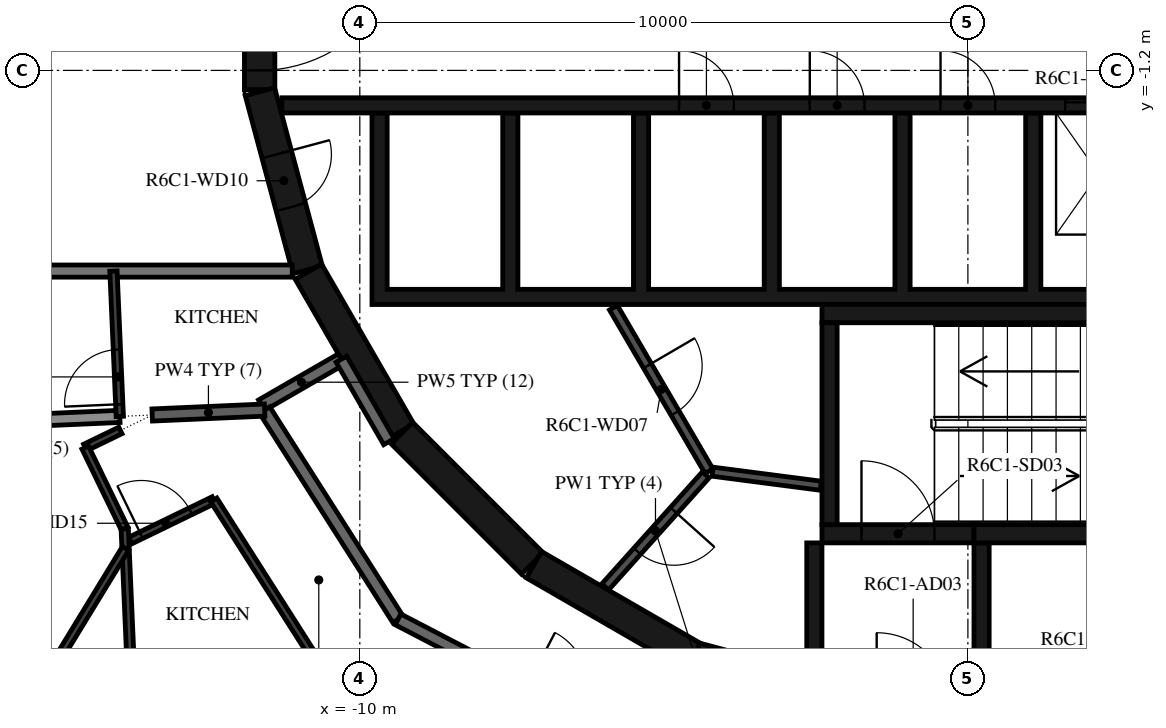
"""IFC4 building model, lengths in metres.
Left out: names, types, materials, properties, quantities, classifications, styles, units other than length and angle.
Written with IfcOpenShell. Run it as: python <this file> out.ifc"""

import sys

from ifc_helpers import new_model, si_unit, direction, frame, frame_2d, origin, place, context, subcontext, project, spatial, polyline, rectangle, outline, extrude, element, fill, save


model = new_model("IFC4")
c1 = context("Model", 3, precision=1e-05, world=origin(), true_north=direction((0.0, 1.0)))
c2 = subcontext(c1, "Body", "Model", "MODEL_VIEW")
j1 = project(units=[si_unit("LENGTHUNIT", "METRE"), si_unit("PLANEANGLEUNIT", "RADIAN")], contexts=[c1])
p1 = place(None, origin())
s1 = spatial("IfcSite", under=j1, at=p1, CompositionType="ELEMENT")
p2 = place(p1, origin())
s2 = spatial("IfcBuilding", under=s1, at=p2, CompositionType="ELEMENT")
p3 = place(p2, frame((0.0, 0.0, 251.2)))
s3 = spatial("IfcBuildingStorey", under=s2, at=p3, CompositionType="ELEMENT", Elevation=251.2)
p4 = place(p3, frame((1.55, -11.643, 0.0), z_axis=(0.0, 0.0, 1.0), x_axis=(0.965948410781, 0.258734743916, 0.0)))
e1 = element("IfcWall", 1, at=p4, inside=s3, PredefinedType="SHEAR", context=c2, shape_type="SweptSolid", body=[
    extrude(rectangle(XDim=3.033, YDim=0.5, at=frame_2d((1.516, 0.0))), origin(), (0.0, 0.0, 1.0), 3.12),
])
p5 = place(p3, frame((-11.647, 1.516, 0.0), z_axis=(0.0, 0.0, 1.0), x_axis=(0.0, -1.0, 0.0)))
e2 = element("IfcWall", 2, at=p5, inside=s3, PredefinedType="SHEAR", context=c2, shape_type="SweptSolid", body=[
    extrude(rectangle(XDim=3.033, YDim=0.5, at=frame_2d((1.516, 0.0))), origin(), (0.0, 0.0, 1.0), 3.12),
])
p6 = place(p5, frame((0.316, 0.0, 0.0)))
e3 = element("IfcOpeningElement", 3, at=p6, cuts=e2, PredefinedType="OPENING", context=c2, shape_type="SweptSolid", body=[
    extrude(rectangle(XDim=2.4, YDim=2.1, at=frame_2d((1.2, 1.05))), frame((0.0, 0.26, 0.0), z_axis=(0.0, -1.0, 0.0), x_axis=(1.0, 0.0, 0.0)), (0.0, 0.0, 1.0), 0.52),
])
p7 = place(p3, frame((-11.643, -1.55, 0.0), z_axis=(0.0, 0.0, 1.0), x_axis=(0.258734743916, -0.965948410781, 0.0)))
e4 = element("IfcWall", 4, at=p7, inside=s3, PredefinedType="SHEAR", context=c2, shape_type="SweptSolid", body=[
    extrude(rectangle(XDim=3.033, YDim=0.5, at=frame_2d((1.516, 0.0))), origin(), (0.0, 0.0, 1.0), 3.12),
])
p8 = place(p7, frame((1.066, 0.0, 0.0)))
e5 = element("IfcOpeningElement", 5, at=p8, cuts=e4, PredefinedType="OPENING", context=c2, shape_type="SweptSolid", body=[
    extrude(rectangle(XDim=0.9, YDim=2.1, at=frame_2d((0.45, 1.05))), frame((0.0, 0.26, 0.0), z_axis=(0.0, -1.0, 0.0), x_axis=(1.0, 0.0, 0.0)), (0.0, 0.0, 1.0), 0.52),
])
p9 = place(p3, frame((-10.845, -4.51, 0.0), z_axis=(0.0, 0.0, 1.0), x_axis=(0.500087131594, -0.865975092491, 0.0)))
e6 = element("IfcWall", 6, at=p9, inside=s3, PredefinedType="SHEAR", context=c2, shape_type="SweptSolid", body=[
    extrude(rectangle(XDim=3.033, YDim=0.5, at=frame_2d((1.516, 0.0))), origin(), (0.0, 0.0, 1.0), 3.12),
])
p10 = place(p3, frame((-9.308, -7.164, 0.0), z_axis=(0.0, 0.0, 1.0), x_axis=(0.707106781187, -0.707106781187, 0.0)))
e7 = element("IfcWall", 7, at=p10, inside=s3, PredefinedType="SHEAR", context=c2, shape_type="SweptSolid", body=[
    extrude(rectangle(XDim=3.032, YDim=0.5, at=frame_2d((1.516, 0.0))), origin(), (0.0, 0.0, 1.0), 3.12),
])
for number, where, z_axis, x_axis in (
    (8, (-7.137, -9.329, 0.0), (0.0, 0.0, 1.0), (0.866, -0.5, 0.0)),
    (9, (-4.479, -10.858, 0.0), (0.0, 0.0, 1.0), (0.966, -0.259, 0.0)),
):
    element("IfcWall", number, at=place(p3, frame(where, z_axis=z_axis, x_axis=x_axis)), inside=s3, PredefinedType="SHEAR", context=c2, shape_type="SweptSolid", body=[
        extrude(rectangle(XDim=3.033, YDim=0.5, at=frame_2d((1.516, 0.0))), origin(), (0.0, 0.0, 1.0), 3.12),
    ])
p11 = place(p3, frame((-2.275, -8.67, 0.0), z_axis=(0.0, 0.0, 1.0), x_axis=(0.0, 1.0, 0.0)))
e10 = element("IfcWall", 10, at=p11, inside=s3, PredefinedType="SHEAR", context=c2, shape_type="SweptSolid", body=[
    extrude(rectangle(XDim=3.32, YDim=0.25, at=frame_2d((1.66, 0.0))), origin(), (0.0, 0.0, 1.0), 3.12),
])
p12 = place(p3, frame((-2.4, -5.2, 0.0), z_axis=(0.0, 0.0, 1.0), x_axis=(1.0, 0.0, 0.0)))
e11 = element("IfcWall", 11, at=p12, inside=s3, PredefinedType="SHEAR", context=c2, shape_type="SweptSolid", body=[
    extrude(rectangle(XDim=7.05, YDim=0.3, at=frame_2d((3.525, 0.0))), origin(), (0.0, 0.0, 1.0), 3.12),
])
p13 = place(p3, frame((0.1, -8.82, 0.0), z_axis=(0.0, 0.0, 1.0), x_axis=(1.0, 0.0, 0.0)))
e12 = element("IfcWall", 12, at=p13, inside=s3, PredefinedType="SHEAR", context=c2, shape_type="SweptSolid", body=[
    extrude(rectangle(XDim=4.55, YDim=0.3, at=frame_2d((2.275, 0.0))), origin(), (0.0, 0.0, 1.0), 3.12),
])
p14 = place(p3, frame((-2.4, -8.82, 0.0), z_axis=(0.0, 0.0, 1.0), x_axis=(1.0, 0.0, 0.0)))
e13 = element("IfcWall", 13, at=p14, inside=s3, PredefinedType="SHEAR", context=c2, shape_type="SweptSolid", body=[
    extrude(rectangle(XDim=2.5, YDim=0.3, at=frame_2d((1.25, 0.0))), origin(), (0.0, 0.0, 1.0), 3.12),
])
p15 = place(p14, frame((0.65, 0.0, 0.0)))
e14 = element("IfcOpeningElement", 14, at=p15, cuts=e13, PredefinedType="OPENING", context=c2, shape_type="SweptSolid", body=[
    extrude(rectangle(XDim=1.2, YDim=2.1, at=frame_2d((0.6, 1.05))), frame((0.0, 0.16, 0.0), z_axis=(0.0, -1.0, 0.0), x_axis=(1.0, 0.0, 0.0)), (0.0, 0.0, 1.0), 0.32),
])
p16 = place(p3, frame((-2.525, -8.97, 0.0), z_axis=(0.0, 0.0, 1.0), x_axis=(0.0, -1.0, 0.0)))
e15 = element("IfcWall", 15, at=p16, inside=s3, PredefinedType="SHEAR", context=c2, shape_type="SweptSolid", body=[
    extrude(rectangle(XDim=2.11, YDim=0.25, at=frame_2d((1.055, 0.0))), origin(), (0.0, 0.0, 1.0), 3.12),
])
p17 = place(p3, frame((0.225, -8.97, 0.0), z_axis=(0.0, 0.0, 1.0), x_axis=(0.0, -1.0, 0.0)))
e16 = element("IfcWall", 16, at=p17, inside=s3, PredefinedType="SHEAR", context=c2, shape_type="SweptSolid", body=[
    extrude(rectangle(XDim=2.41, YDim=0.25, at=frame_2d((1.205, 0.0))), origin(), (0.0, 0.0, 1.0), 3.12),
])
p18 = place(p3, origin())
e17 = element("IfcWall", 17, at=p18, inside=s3, PredefinedType="SHEAR", context=c2, shape_type="SweptSolid", body=[
    extrude(outline(polyline([(9.8, -5.05), (9.8, -4.8), (9.8, -1.9), (9.55, -1.9), (9.55, -4.8), (7.65, -4.8), (7.65, -1.9), (7.4, -1.9), (7.4, -4.8), (5.5, -4.8), (5.5, -1.9), (5.25, -1.9), (5.25, -4.8), (3.35, -4.8), (3.35, -1.9), (3.1, -1.9), (3.1, -4.8), (1.2, -4.8), (1.2, -1.9), (0.95, -1.9), (0.95, -4.8), (-0.95, -4.8), (-0.95, -1.9), (-1.2, -1.9), (-1.2, -4.8), (-3.1, -4.8), (-3.1, -1.9), (-3.35, -1.9), (-3.35, -4.8), (-5.25, -4.8), (-5.25, -1.9), (-5.5, -1.9), (-5.5, -4.8), (-7.4, -4.8), (-7.4, -1.9), (-7.65, -1.9), (-7.65, -4.8), (-9.55, -4.8), (-9.55, -1.9), (-9.8, -1.9), (-9.8, -4.8), (-9.8, -5.05), (9.8, -5.05)])), origin(), (0.0, 0.0, 1.0), 3.12),
])
p19 = place(p3, frame((-11.28, -1.775, 0.0), z_axis=(0.0, 0.0, 1.0), x_axis=(1.0, 0.0, 0.0)))
e18 = element("IfcWall", 18, at=p19, inside=s3, PredefinedType="SHEAR", context=c2, shape_type="SweptSolid", body=[
    extrude(rectangle(XDim=14.38, YDim=0.25, at=frame_2d((7.19, 0.0))), origin(), (0.0, 0.0, 1.0), 3.12),
])
p20 = place(p19, frame((12.88, 0.0, 0.0)))
e19 = element("IfcOpeningElement", 19, at=p20, cuts=e18, PredefinedType="OPENING", context=c2, shape_type="SweptSolid", body=[
    extrude(rectangle(XDim=1.1, YDim=2.1, at=frame_2d((0.55, 1.05))), frame((0.0, 0.135, 0.0), z_axis=(0.0, -1.0, 0.0), x_axis=(1.0, 0.0, 0.0)), (0.0, 0.0, 1.0), 0.27),
])
p21 = place(p19, frame((6.53, 0.0, 0.0)))
e20 = element("IfcOpeningElement", 20, at=p21, cuts=e18, PredefinedType="OPENING", context=c2, shape_type="SweptSolid", body=[
    extrude(rectangle(XDim=0.9, YDim=2.1, at=frame_2d((0.45, 1.05))), frame((0.0, 0.135, 0.0), z_axis=(0.0, -1.0, 0.0), x_axis=(1.0, 0.0, 0.0)), (0.0, 0.0, 1.0), 0.27),
])
p22 = place(p19, frame((8.68, 0.0, 0.0)))
e21 = element("IfcOpeningElement", 21, at=p22, cuts=e18, PredefinedType="OPENING", context=c2, shape_type="SweptSolid", body=[
    extrude(rectangle(XDim=0.9, YDim=2.1, at=frame_2d((0.45, 1.05))), frame((0.0, 0.135, 0.0), z_axis=(0.0, -1.0, 0.0), x_axis=(1.0, 0.0, 0.0)), (0.0, 0.0, 1.0), 0.27),
])
p23 = place(p19, frame((10.83, 0.0, 0.0)))
e22 = element("IfcOpeningElement", 22, at=p23, cuts=e18, PredefinedType="OPENING", context=c2, shape_type="SweptSolid", body=[
    extrude(rectangle(XDim=0.9, YDim=2.1, at=frame_2d((0.45, 1.05))), frame((0.0, 0.135, 0.0), z_axis=(0.0, -1.0, 0.0), x_axis=(1.0, 0.0, 0.0)), (0.0, 0.0, 1.0), 0.27),
])
p24 = place(p3, frame((-5.829, -5.102, 0.0), z_axis=(0.0, 0.0, 1.0), x_axis=(0.504480008384, -0.863423373057, 0.0)))
e23 = element("IfcWall", 23, at=p24, inside=s3, PredefinedType="PARTITIONING", context=c2, shape_type="SweptSolid", body=[
    extrude(rectangle(XDim=3.115, YDim=0.15, at=frame_2d((1.558, 0.0))), origin(), (0.0, 0.0, 1.0), 3.12),
])
p25 = place(p24, frame((1.107, 0.0, 0.0)))
e24 = element("IfcOpeningElement", 24, at=p25, cuts=e23, PredefinedType="OPENING", context=c2, shape_type="SweptSolid", body=[
    extrude(rectangle(XDim=0.9, YDim=2.1, at=frame_2d((0.45, 1.05))), frame((0.0, 0.085, 0.0), z_axis=(0.0, -1.0, 0.0), x_axis=(1.0, 0.0, 0.0)), (0.0, 0.0, 1.0), 0.17),
])
p26 = place(p3, frame((-4.311, -7.851, 0.0), z_axis=(0.0, 0.0, 1.0), x_axis=(-0.667869133096, -0.744278725383, 0.0)))
e25 = element("IfcWall", 25, at=p26, inside=s3, PredefinedType="PARTITIONING", context=c2, shape_type="SweptSolid", body=[
    extrude(rectangle(XDim=2.476, YDim=0.15, at=frame_2d((1.238, 0.0))), origin(), (0.0, 0.0, 1.0), 3.12),
])
p27 = place(p26, frame((0.788, 0.0, 0.0)))
e26 = element("IfcOpeningElement", 26, at=p27, cuts=e25, PredefinedType="OPENING", context=c2, shape_type="SweptSolid", body=[
    extrude(rectangle(XDim=0.9, YDim=2.1, at=frame_2d((0.45, 1.05))), frame((0.0, 0.085, 0.0), z_axis=(0.0, -1.0, 0.0), x_axis=(1.0, 0.0, 0.0)), (0.0, 0.0, 1.0), 0.17),
])
p28 = place(p3, frame((-4.198, -7.799, 0.0), z_axis=(0.0, 0.0, 1.0), x_axis=(0.991686747293, -0.128675542523, 0.0)))
e27 = element("IfcWall", 27, at=p28, inside=s3, PredefinedType="PARTITIONING", context=c2, shape_type="SweptSolid", body=[
    extrude(rectangle(XDim=1.793, YDim=0.15, at=frame_2d((0.896, 0.0))), origin(), (0.0, 0.0, 1.0), 3.12),
])
p29 = place(p3, frame((-10.303, -5.949, 0.0), z_axis=(0.0, 0.0, 1.0), x_axis=(-0.866043382451, -0.499968858743, 0.0)))
e28 = element("IfcWall", 28, at=p29, inside=s3, PredefinedType="STANDARD", context=c2, shape_type="SweptSolid", body=[
    extrude(rectangle(XDim=1.515, YDim=0.2, at=frame_2d((0.758, 0.0))), origin(), (0.0, 0.0, 1.0), 3.12),
])
p30 = place(p3, frame((-9.52, -7.305, 0.0), z_axis=(0.0, 0.0, 1.0), x_axis=(-0.500028278809, 0.866009076391, 0.0)))
e29 = element("IfcWall", 29, at=p30, inside=s3, PredefinedType="STANDARD", context=c2, shape_type="SweptSolid", body=[
    extrude(rectangle(XDim=1.566, YDim=0.2, at=frame_2d((0.783, 0.0))), origin(), (0.0, 0.0, 1.0), 3.12),
])
p31 = place(p3, frame((-11.565, -6.786, 0.0), z_axis=(0.0, 0.0, 1.0), x_axis=(0.537297327359, -0.843392898958, 0.0)))
e30 = element("IfcWall", 30, at=p31, inside=s3, PredefinedType="STANDARD", context=c2, shape_type="SweptSolid", body=[
    extrude(rectangle(XDim=4.081, YDim=0.2, at=frame_2d((2.041, 0.0))), origin(), (0.0, 0.0, 1.0), 3.12),
])
p32 = place(p3, frame((-9.372, -10.228, 0.0), z_axis=(0.0, 0.0, 1.0), x_axis=(0.887005184532, -0.461759464021, 0.0)))
e31 = element("IfcWall", 31, at=p32, inside=s3, PredefinedType="STANDARD", context=c2, shape_type="SweptSolid", body=[
    extrude(rectangle(XDim=7.181, YDim=0.2, at=frame_2d((3.591, 0.0))), origin(), (0.0, 0.0, 1.0), 3.12),
])
p33 = place(p32, frame((2.391, 0.0, 0.0)))
e32 = element("IfcOpeningElement", 32, at=p33, cuts=e31, PredefinedType="OPENING", context=c2, shape_type="SweptSolid", body=[
    extrude(rectangle(XDim=1.0, YDim=2.1, at=frame_2d((0.5, 1.05))), frame((0.0, 0.11, 0.0), z_axis=(0.0, -1.0, 0.0), x_axis=(1.0, 0.0, 0.0)), (0.0, 0.0, 1.0), 0.22),
])
p34 = place(p3, frame((-17.655, -4.5, 0.0), z_axis=(0.0, 0.0, 1.0), x_axis=(1.0, 0.0, 0.0)))
e33 = element("IfcWall", 33, at=p34, inside=s3, PredefinedType="STANDARD", context=c2, shape_type="SweptSolid", body=[
    extrude(rectangle(XDim=6.543, YDim=0.2, at=frame_2d((3.272, 0.0))), origin(), (0.0, 0.0, 1.0), 3.12),
])
p35 = place(p3, frame((-17.544, -7.047, 0.0), z_axis=(0.0, 0.0, 1.0), x_axis=(0.999045894436, 0.043672655174, 0.0)))
e34 = element("IfcWall", 34, at=p35, inside=s3, PredefinedType="STANDARD", context=c2, shape_type="SweptSolid", body=[
    extrude(rectangle(XDim=3.6, YDim=0.2, at=frame_2d((1.8, 0.0))), origin(), (0.0, 0.0, 1.0), 2.73),
])
p36 = place(p3, frame((-13.414, -6.867, 0.0), z_axis=(0.0, 0.0, 1.0), x_axis=(0.999046427216, 0.043660465726, 0.0)))
e35 = element("IfcWall", 35, at=p36, inside=s3, PredefinedType="STANDARD", context=c2, shape_type="SweptSolid", body=[
    extrude(rectangle(XDim=1.851, YDim=0.2, at=frame_2d((0.925, 0.0))), origin(), (0.0, 0.0, 1.0), 3.12),
])
p37 = place(p3, frame((-13.947, -6.89, 0.0), z_axis=(0.0, 0.0, 1.0), x_axis=(-0.043680814195, 0.999045537737, 0.0)))
e36 = element("IfcWall", 36, at=p37, inside=s3, PredefinedType="PARTITIONING", context=c2, shape_type="SweptSolid", body=[
    extrude(rectangle(XDim=2.392, YDim=0.12, at=frame_2d((1.196, 0.0))), origin(), (0.0, 0.0, 1.0), 3.12),
])
p38 = place(p37, frame((0.2, 0.0, 0.0)))
e37 = element("IfcOpeningElement", 37, at=p38, cuts=e36, PredefinedType="OPENING", context=c2, shape_type="SweptSolid", body=[
    extrude(rectangle(XDim=0.9, YDim=2.1, at=frame_2d((0.45, 1.05))), frame((0.0, 0.07, 0.0), z_axis=(0.0, -1.0, 0.0), x_axis=(1.0, 0.0, 0.0)), (0.0, 0.0, 1.0), 0.14),
])
p39 = place(p3, frame((-13.937, -7.121, 0.0), z_axis=(0.0, 0.0, 1.0), x_axis=(-0.899601864835, -0.436710985418, 0.0)))
e38 = element("IfcWall", 38, at=p39, inside=s3, PredefinedType="PARTITIONING", context=c2, shape_type="SweptSolid", body=[
    extrude(rectangle(XDim=0.644, YDim=0.12, at=frame_2d((0.322, 0.0))), origin(), (0.0, 0.0, 1.0), 3.12),
])
p40 = place(p3, frame((-14.516, -7.402, 0.0), z_axis=(0.0, 0.0, 1.0), x_axis=(0.436676244377, -0.899618729016, 0.0)))
e39 = element("IfcWall", 39, at=p40, inside=s3, PredefinedType="PARTITIONING", context=c2, shape_type="SweptSolid", body=[
    extrude(rectangle(XDim=1.487, YDim=0.12, at=frame_2d((0.744, 0.0))), origin(), (0.0, 0.0, 1.0), 3.12),
])
p41 = place(p3, frame((-13.773, -8.931, 0.0), z_axis=(0.0, 0.0, 1.0), x_axis=(0.899585443678, 0.436744810527, 0.0)))
e40 = element("IfcWall", 40, at=p41, inside=s3, PredefinedType="PARTITIONING", context=c2, shape_type="SweptSolid", body=[
    extrude(rectangle(XDim=1.525, YDim=0.12, at=frame_2d((0.762, 0.0))), origin(), (0.0, 0.0, 1.0), 3.12),
])
p42 = place(p41, frame((0.2, 0.0, 0.0)))
e41 = element("IfcOpeningElement", 41, at=p42, cuts=e40, PredefinedType="OPENING", context=c2, shape_type="SweptSolid", body=[
    extrude(rectangle(XDim=0.9, YDim=2.1, at=frame_2d((0.45, 1.05))), frame((0.0, 0.07, 0.0), z_axis=(0.0, -1.0, 0.0), x_axis=(1.0, 0.0, 0.0)), (0.0, 0.0, 1.0), 0.14),
])
p43 = place(p3, frame((-12.402, -8.265, 0.0), z_axis=(0.0, 0.0, 1.0), x_axis=(0.537321213777, -0.843377681247, 0.0)))
e42 = element("IfcWall", 42, at=p43, inside=s3, PredefinedType="PARTITIONING", context=c2, shape_type="SweptSolid", body=[
    extrude(rectangle(XDim=3.685, YDim=0.12, at=frame_2d((1.843, 0.0))), origin(), (0.0, 0.0, 1.0), 3.12),
])
p44 = place(p3, frame((-13.496, -17.218, 0.0), z_axis=(0.0, 0.0, 1.0), x_axis=(-0.043640714674, 0.999047290183, 0.0)))
e43 = element("IfcWall", 43, at=p44, inside=s3, PredefinedType="PARTITIONING", context=c2, shape_type="SweptSolid", body=[
    extrude(rectangle(XDim=8.487, YDim=0.12, at=frame_2d((4.243, 0.0))), origin(), (0.0, 0.0, 1.0), 3.12),
])
p45 = place(p44, frame((4.608, 0.0, 0.0)))
e44 = element("IfcOpeningElement", 44, at=p45, cuts=e43, PredefinedType="OPENING", context=c2, shape_type="SweptSolid", body=[
    extrude(rectangle(XDim=0.9, YDim=2.1, at=frame_2d((0.45, 1.05))), frame((0.0, 0.07, 0.0), z_axis=(0.0, -1.0, 0.0), x_axis=(1.0, 0.0, 0.0)), (0.0, 0.0, 1.0), 0.14),
])
p46 = place(p3, frame((-17.215, -14.57, 0.0), z_axis=(0.0, 0.0, 1.0), x_axis=(0.520949659667, 0.853587401555, 0.0)))
e45 = element("IfcWall", 45, at=p46, inside=s3, PredefinedType="PARTITIONING", context=c2, shape_type="SweptSolid", body=[
    extrude(rectangle(XDim=6.455, YDim=0.12, at=frame_2d((3.228, 0.0))), origin(), (0.0, 0.0, 1.0), 3.12),
])
p47 = place(p46, frame((1.2, 0.0, 0.0)))
e46 = element("IfcOpeningElement", 46, at=p47, cuts=e45, PredefinedType="OPENING", context=c2, shape_type="SweptSolid", body=[
    extrude(rectangle(XDim=0.9, YDim=2.1, at=frame_2d((0.45, 1.05))), frame((0.0, 0.07, 0.0), z_axis=(0.0, -1.0, 0.0), x_axis=(1.0, 0.0, 0.0)), (0.0, 0.0, 1.0), 0.14),
])
p48 = place(p15, origin())
e47 = element("IfcDoor", 47, at=p48, inside=s3, OperationType="SINGLE_SWING_LEFT", PredefinedType="DOOR", context=c2, shape_type="SweptSolid", body=[
    extrude(rectangle(XDim=1.2, YDim=2.1, at=frame_2d((0.6, 1.05))), frame((0.0, 0.025, 0.0), z_axis=(0.0, -1.0, 0.0), x_axis=(1.0, 0.0, 0.0)), (0.0, 0.0, 1.0), 0.05),
])
fill(e14, e47)
p49 = place(p6, origin())
e48 = element("IfcDoor", 48, at=p49, inside=s3, OperationType="DOUBLE_DOOR_SINGLE_SWING", PredefinedType="DOOR", context=c2, shape_type="SweptSolid", body=[
    extrude(rectangle(XDim=2.4, YDim=2.1, at=frame_2d((1.2, 1.05))), frame((0.0, 0.025, 0.0), z_axis=(0.0, -1.0, 0.0), x_axis=(1.0, 0.0, 0.0)), (0.0, 0.0, 1.0), 0.05),
])
fill(e3, e48)
p50 = place(p20, origin())
e49 = element("IfcDoor", 49, at=p50, inside=s3, OperationType="DOUBLE_DOOR_SLIDING", PredefinedType="DOOR", context=c2, shape_type="SweptSolid", body=[
    extrude(rectangle(XDim=1.1, YDim=2.1, at=frame_2d((0.55, 1.05))), frame((0.0, 0.025, 0.0), z_axis=(0.0, -1.0, 0.0), x_axis=(1.0, 0.0, 0.0)), (0.0, 0.0, 1.0), 0.05),
])
fill(e19, e49)
p51 = place(p21, origin())
e50 = element("IfcDoor", 50, at=p51, inside=s3, OperationType="SINGLE_SWING_LEFT", PredefinedType="DOOR", context=c2, shape_type="SweptSolid", body=[
    extrude(rectangle(XDim=0.9, YDim=2.1, at=frame_2d((0.45, 1.05))), frame((0.0, 0.025, 0.0), z_axis=(0.0, -1.0, 0.0), x_axis=(1.0, 0.0, 0.0)), (0.0, 0.0, 1.0), 0.05),
])
fill(e20, e50)
p52 = place(p22, origin())
e51 = element("IfcDoor", 51, at=p52, inside=s3, OperationType="SINGLE_SWING_RIGHT", PredefinedType="DOOR", context=c2, shape_type="SweptSolid", body=[
    extrude(rectangle(XDim=0.9, YDim=2.1, at=frame_2d((0.45, 1.05))), frame((0.0, 0.025, 0.0), z_axis=(0.0, -1.0, 0.0), x_axis=(1.0, 0.0, 0.0)), (0.0, 0.0, 1.0), 0.05),
])
fill(e21, e51)
p53 = place(p23, origin())
e52 = element("IfcDoor", 52, at=p53, inside=s3, OperationType="SINGLE_SWING_LEFT", PredefinedType="DOOR", context=c2, shape_type="SweptSolid", body=[
    extrude(rectangle(XDim=0.9, YDim=2.1, at=frame_2d((0.45, 1.05))), frame((0.0, 0.025, 0.0), z_axis=(0.0, -1.0, 0.0), x_axis=(1.0, 0.0, 0.0)), (0.0, 0.0, 1.0), 0.05),
])
fill(e22, e52)
p54 = place(p27, origin())
e53 = element("IfcDoor", 53, at=p54, inside=s3, OperationType="SINGLE_SWING_RIGHT", PredefinedType="DOOR", context=c2, shape_type="SweptSolid", body=[
    extrude(rectangle(XDim=0.9, YDim=2.1, at=frame_2d((0.45, 1.05))), frame((0.0, 0.025, 0.0), z_axis=(0.0, -1.0, 0.0), x_axis=(1.0, 0.0, 0.0)), (0.0, 0.0, 1.0), 0.05),
])
fill(e26, e53)
p55 = place(p25, origin())
e54 = element("IfcDoor", 54, at=p55, inside=s3, OperationType="SINGLE_SWING_LEFT", PredefinedType="DOOR", context=c2, shape_type="SweptSolid", body=[
    extrude(rectangle(XDim=0.9, YDim=2.1, at=frame_2d((0.45, 1.05))), frame((0.0, 0.025, 0.0), z_axis=(0.0, -1.0, 0.0), x_axis=(1.0, 0.0, 0.0)), (0.0, 0.0, 1.0), 0.05),
])
fill(e24, e54)
p56 = place(p8, origin())
e55 = element("IfcDoor", 55, at=p56, inside=s3, OperationType="SINGLE_SWING_RIGHT", PredefinedType="DOOR", context=c2, shape_type="SweptSolid", body=[
    extrude(rectangle(XDim=0.9, YDim=2.1, at=frame_2d((0.45, 1.05))), frame((0.0, 0.025, 0.0), z_axis=(0.0, -1.0, 0.0), x_axis=(1.0, 0.0, 0.0)), (0.0, 0.0, 1.0), 0.05),
])
fill(e5, e55)
p57 = place(p38, origin())
e56 = element("IfcDoor", 56, at=p57, inside=s3, OperationType="SINGLE_SWING_LEFT", PredefinedType="DOOR", context=c2, shape_type="SweptSolid", body=[
    extrude(rectangle(XDim=0.9, YDim=2.1, at=frame_2d((0.45, 1.05))), frame((0.0, 0.025, 0.0), z_axis=(0.0, -1.0, 0.0), x_axis=(1.0, 0.0, 0.0)), (0.0, 0.0, 1.0), 0.05),
])
fill(e37, e56)
p58 = place(p42, origin())
e57 = element("IfcDoor", 57, at=p58, inside=s3, OperationType="SINGLE_SWING_LEFT", PredefinedType="DOOR", context=c2, shape_type="SweptSolid", body=[
    extrude(rectangle(XDim=0.9, YDim=2.1, at=frame_2d((0.45, 1.05))), frame((0.0, 0.025, 0.0), z_axis=(0.0, -1.0, 0.0), x_axis=(1.0, 0.0, 0.0)), (0.0, 0.0, 1.0), 0.05),
])
fill(e41, e57)
save(model, sys.argv[1])
